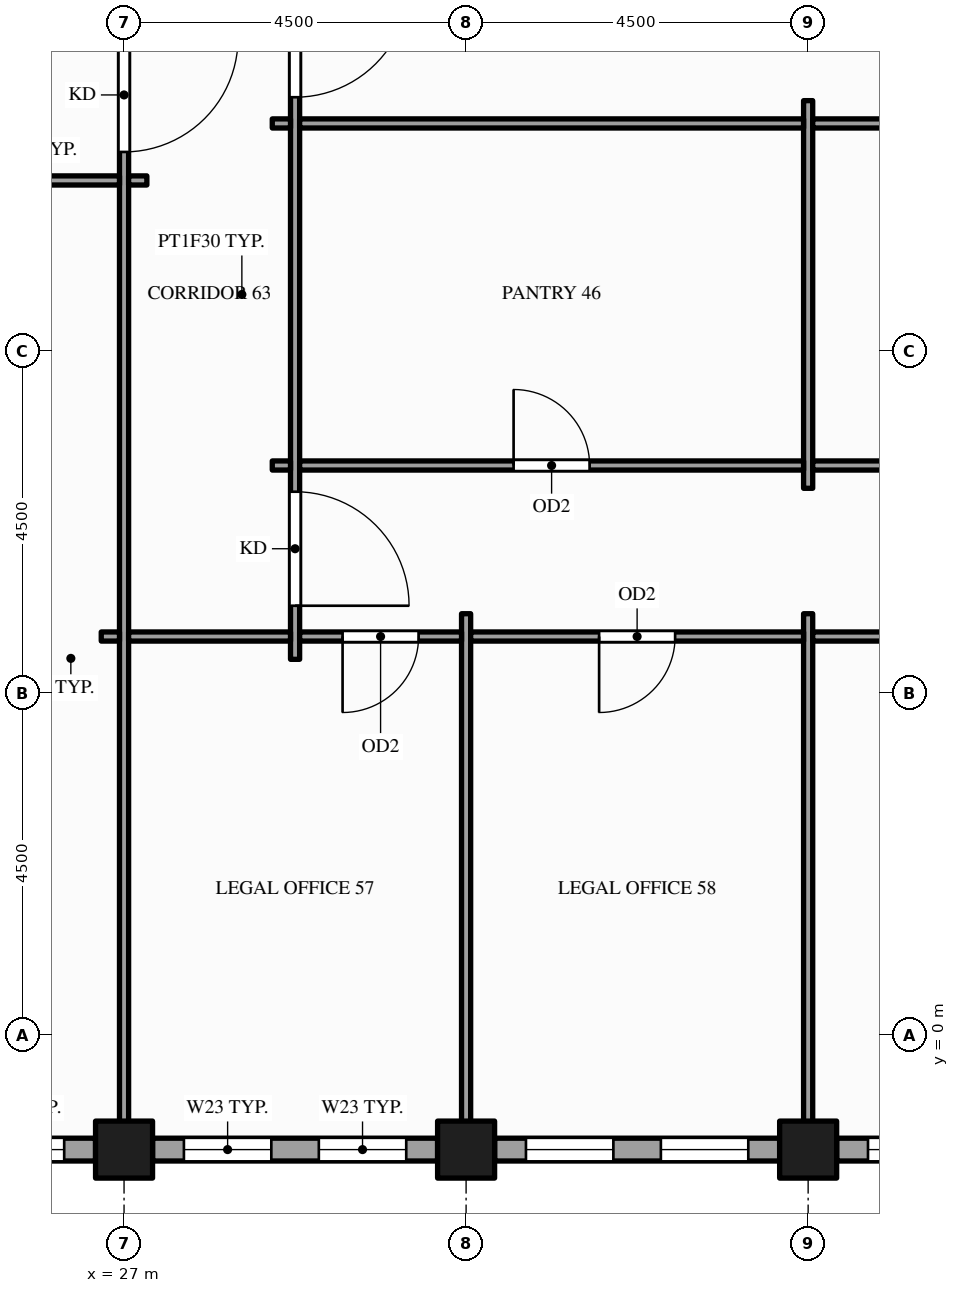
"""IFC4 building model, lengths in metres.
Left out: names, types, materials, properties, quantities, classifications, styles, units other than length and angle.
Written with IfcOpenShell. Run it as: python <this file> out.ifc"""

import sys

from ifc_helpers import new_model, si_unit, direction, frame, frame_2d, origin, origin_2d, place, context, subcontext, project, spatial, rectangle, hollow_rectangle, extrude, element, fill, save


model = new_model("IFC4")
c1 = context("Model", 3, precision=1e-05, world=origin(), true_north=direction((0.0, 1.0)))
c2 = subcontext(c1, "Body", "Model", "MODEL_VIEW")
j1 = project(units=[si_unit("LENGTHUNIT", "METRE"), si_unit("PLANEANGLEUNIT", "RADIAN")], contexts=[c1])
p1 = place(None, origin())
s1 = spatial("IfcSite", under=j1, at=p1, CompositionType="ELEMENT")
p2 = place(p1, origin())
s2 = spatial("IfcBuilding", under=s1, at=p2, CompositionType="ELEMENT")
p3 = place(p2, frame((0.0, 0.0, 207.0)))
s3 = spatial("IfcBuildingStorey", under=s2, at=p3, CompositionType="ELEMENT", Elevation=207.0)
for number, where, z_axis, x_axis in (
    (1, (27.0, -1.5, -0.15), (0.0, 0.0, 1.0), (1.0, 0.0, 0.0)),
    (2, (31.5, -1.5, -0.15), (0.0, 0.0, 1.0), (1.0, 0.0, 0.0)),
    (3, (36.0, -1.5, -0.15), (0.0, 0.0, 1.0), (1.0, 0.0, 0.0)),
):
    element("IfcColumn", number, at=place(p3, frame(where, z_axis=z_axis, x_axis=x_axis)), inside=s3, PredefinedType="COLUMN", context=c2, shape_type="SweptSolid", body=[
        extrude(hollow_rectangle(XDim=0.75, YDim=0.75, WallThickness=0.036, at=origin_2d()), origin(), (0.0, 0.0, 1.0), 4.0),
    ])
p4 = place(p3, frame((22.875, -1.5, 0.0), z_axis=(0.0, 0.0, 1.0), x_axis=(1.0, 0.0, 0.0)))
e4 = element("IfcWall", 4, at=p4, inside=s3, PredefinedType="STANDARD", context=c2, shape_type="SweptSolid", body=[
    extrude(rectangle(XDim=3.75, YDim=0.3, at=frame_2d((1.875, 0.0))), origin(), (0.0, 0.0, 1.0), 2.76),
])
p5 = place(p4, frame((0.413, 0.0, 0.9)))
e5 = element("IfcOpeningElement", 5, at=p5, cuts=e4, PredefinedType="OPENING", context=c2, shape_type="SweptSolid", body=[
    extrude(rectangle(XDim=1.15, YDim=1.5, at=frame_2d((0.575, 0.75))), frame((0.0, 0.16, 0.0), z_axis=(0.0, -1.0, 0.0), x_axis=(1.0, 0.0, 0.0)), (0.0, 0.0, 1.0), 0.32),
])
p6 = place(p4, frame((2.188, 0.0, 0.9)))
e6 = element("IfcOpeningElement", 6, at=p6, cuts=e4, PredefinedType="OPENING", context=c2, shape_type="SweptSolid", body=[
    extrude(rectangle(XDim=1.15, YDim=1.5, at=frame_2d((0.575, 0.75))), frame((0.0, 0.16, 0.0), z_axis=(0.0, -1.0, 0.0), x_axis=(1.0, 0.0, 0.0)), (0.0, 0.0, 1.0), 0.32),
])
p7 = place(p3, frame((27.375, -1.5, 0.0), z_axis=(0.0, 0.0, 1.0), x_axis=(1.0, 0.0, 0.0)))
e7 = element("IfcWall", 7, at=p7, inside=s3, PredefinedType="STANDARD", context=c2, shape_type="SweptSolid", body=[
    extrude(rectangle(XDim=3.75, YDim=0.3, at=frame_2d((1.875, 0.0))), origin(), (0.0, 0.0, 1.0), 2.87),
])
p8 = place(p7, frame((0.413, 0.0, 0.9)))
e8 = element("IfcOpeningElement", 8, at=p8, cuts=e7, PredefinedType="OPENING", context=c2, shape_type="SweptSolid", body=[
    extrude(rectangle(XDim=1.15, YDim=1.75, at=frame_2d((0.575, 0.875))), frame((0.0, 0.16, 0.0), z_axis=(0.0, -1.0, 0.0), x_axis=(1.0, 0.0, 0.0)), (0.0, 0.0, 1.0), 0.32),
])
p9 = place(p7, frame((2.188, 0.0, 0.9)))
e9 = element("IfcOpeningElement", 9, at=p9, cuts=e7, PredefinedType="OPENING", context=c2, shape_type="SweptSolid", body=[
    extrude(rectangle(XDim=1.15, YDim=1.75, at=frame_2d((0.575, 0.875))), frame((0.0, 0.16, 0.0), z_axis=(0.0, -1.0, 0.0), x_axis=(1.0, 0.0, 0.0)), (0.0, 0.0, 1.0), 0.32),
])
p10 = place(p3, frame((31.875, -1.5, 0.0), z_axis=(0.0, 0.0, 1.0), x_axis=(1.0, 0.0, 0.0)))
e10 = element("IfcWall", 10, at=p10, inside=s3, PredefinedType="STANDARD", context=c2, shape_type="SweptSolid", body=[
    extrude(rectangle(XDim=3.75, YDim=0.3, at=frame_2d((1.875, 0.0))), origin(), (0.0, 0.0, 1.0), 2.87),
])
p11 = place(p10, frame((0.413, 0.0, 0.9)))
e11 = element("IfcOpeningElement", 11, at=p11, cuts=e10, PredefinedType="OPENING", context=c2, shape_type="SweptSolid", body=[
    extrude(rectangle(XDim=1.15, YDim=1.75, at=frame_2d((0.575, 0.875))), frame((0.0, 0.16, 0.0), z_axis=(0.0, -1.0, 0.0), x_axis=(1.0, 0.0, 0.0)), (0.0, 0.0, 1.0), 0.32),
])
p12 = place(p10, frame((2.188, 0.0, 0.9)))
e12 = element("IfcOpeningElement", 12, at=p12, cuts=e10, PredefinedType="OPENING", context=c2, shape_type="SweptSolid", body=[
    extrude(rectangle(XDim=1.15, YDim=1.75, at=frame_2d((0.575, 0.875))), frame((0.0, 0.16, 0.0), z_axis=(0.0, -1.0, 0.0), x_axis=(1.0, 0.0, 0.0)), (0.0, 0.0, 1.0), 0.32),
])
p13 = place(p3, frame((36.375, -1.5, 0.0), z_axis=(0.0, 0.0, 1.0), x_axis=(1.0, 0.0, 0.0)))
e13 = element("IfcWall", 13, at=p13, inside=s3, PredefinedType="STANDARD", context=c2, shape_type="SweptSolid", body=[
    extrude(rectangle(XDim=3.75, YDim=0.3, at=frame_2d((1.875, 0.0))), origin(), (0.0, 0.0, 1.0), 2.87),
])
p14 = place(p13, frame((0.413, 0.0, 0.9)))
e14 = element("IfcOpeningElement", 14, at=p14, cuts=e13, PredefinedType="OPENING", context=c2, shape_type="SweptSolid", body=[
    extrude(rectangle(XDim=1.15, YDim=1.75, at=frame_2d((0.575, 0.875))), frame((0.0, 0.16, 0.0), z_axis=(0.0, -1.0, 0.0), x_axis=(1.0, 0.0, 0.0)), (0.0, 0.0, 1.0), 0.32),
])
p15 = place(p13, frame((2.188, 0.0, 0.9)))
e15 = element("IfcOpeningElement", 15, at=p15, cuts=e13, PredefinedType="OPENING", context=c2, shape_type="SweptSolid", body=[
    extrude(rectangle(XDim=1.15, YDim=1.75, at=frame_2d((0.575, 0.875))), frame((0.0, 0.16, 0.0), z_axis=(0.0, -1.0, 0.0), x_axis=(1.0, 0.0, 0.0)), (0.0, 0.0, 1.0), 0.32),
])
p16 = place(p3, frame((27.0, -1.35, 0.0), z_axis=(0.0, 0.0, 1.0), x_axis=(0.0, 1.0, 0.0)))
e16 = element("IfcWall", 16, at=p16, inside=s3, PredefinedType="PARTITIONING", context=c2, shape_type="SweptSolid", body=[
    extrude(rectangle(XDim=22.48, YDim=0.12, at=frame_2d((11.24, 0.0))), origin(), (0.0, 0.0, 1.0), 2.87),
])
p17 = place(p16, frame((12.975, 0.0, 0.0)))
e17 = element("IfcOpeningElement", 17, at=p17, cuts=e16, PredefinedType="OPENING", context=c2, shape_type="SweptSolid", body=[
    extrude(rectangle(XDim=1.5, YDim=2.1, at=frame_2d((0.75, 1.05))), frame((0.0, 0.07, 0.0), z_axis=(0.0, -1.0, 0.0), x_axis=(1.0, 0.0, 0.0)), (0.0, 0.0, 1.0), 0.14),
])
p18 = place(p3, frame((29.25, 4.95, 0.0), z_axis=(0.0, 0.0, 1.0), x_axis=(0.0, 1.0, 0.0)))
e18 = element("IfcWall", 18, at=p18, inside=s3, PredefinedType="PARTITIONING", context=c2, shape_type="SweptSolid", body=[
    extrude(rectangle(XDim=9.6, YDim=0.12, at=frame_2d((4.8, 0.0))), origin(), (0.0, 0.0, 1.0), 2.87),
])
p19 = place(p18, frame((0.705, 0.0, 0.0)))
e19 = element("IfcOpeningElement", 19, at=p19, cuts=e18, PredefinedType="OPENING", context=c2, shape_type="SweptSolid", body=[
    extrude(rectangle(XDim=1.5, YDim=2.1, at=frame_2d((0.75, 1.05))), frame((0.0, 0.07, 0.0), z_axis=(0.0, -1.0, 0.0), x_axis=(1.0, 0.0, 0.0)), (0.0, 0.0, 1.0), 0.14),
])
p20 = place(p18, frame((7.395, 0.0, 0.0)))
e20 = element("IfcOpeningElement", 20, at=p20, cuts=e18, PredefinedType="OPENING", context=c2, shape_type="SweptSolid", body=[
    extrude(rectangle(XDim=1.5, YDim=2.1, at=frame_2d((0.75, 1.05))), frame((0.0, 0.07, 0.0), z_axis=(0.0, -1.0, 0.0), x_axis=(1.0, 0.0, 0.0)), (0.0, 0.0, 1.0), 0.14),
])
for number, where, z_axis, x_axis in (
    (21, (31.5, -1.35, 0.0), (0.0, 0.0, 1.0), (0.0, 1.0, 0.0)),
    (22, (36.0, -1.35, 0.0), (0.0, 0.0, 1.0), (0.0, 1.0, 0.0)),
):
    element("IfcWall", number, at=place(p3, frame(where, z_axis=z_axis, x_axis=x_axis)), inside=s3, PredefinedType="PARTITIONING", context=c2, shape_type="SweptSolid", body=[
        extrude(rectangle(XDim=6.9, YDim=0.12, at=frame_2d((3.45, 0.0))), origin(), (0.0, 0.0, 1.0), 2.87),
    ])
p21 = place(p3, frame((36.0, 7.2, 0.0), z_axis=(0.0, 0.0, 1.0), x_axis=(0.0, 1.0, 0.0)))
e23 = element("IfcWall", 23, at=p21, inside=s3, PredefinedType="PARTITIONING", context=c2, shape_type="SweptSolid", body=[
    extrude(rectangle(XDim=5.1, YDim=0.12, at=frame_2d((2.55, 0.0))), origin(), (0.0, 0.0, 1.0), 2.87),
])
p22 = place(p3, frame((26.7, 5.25, 0.0), z_axis=(0.0, 0.0, 1.0), x_axis=(1.0, 0.0, 0.0)))
e24 = element("IfcWall", 24, at=p22, inside=s3, PredefinedType="PARTITIONING", context=c2, shape_type="SweptSolid", body=[
    extrude(rectangle(XDim=0.24, YDim=0.12, at=frame_2d((0.12, 0.0))), origin(), (0.0, 0.0, 1.0), 2.87),
])
p23 = place(p3, frame((27.06, 5.25, 0.0), z_axis=(0.0, 0.0, 1.0), x_axis=(1.0, 0.0, 0.0)))
e25 = element("IfcWall", 25, at=p23, inside=s3, PredefinedType="PARTITIONING", context=c2, shape_type="SweptSolid", body=[
    extrude(rectangle(XDim=2.13, YDim=0.12, at=frame_2d((1.065, 0.0))), origin(), (0.0, 0.0, 1.0), 2.87),
])
p24 = place(p3, frame((29.31, 5.25, 0.0), z_axis=(0.0, 0.0, 1.0), x_axis=(1.0, 0.0, 0.0)))
e26 = element("IfcWall", 26, at=p24, inside=s3, PredefinedType="PARTITIONING", context=c2, shape_type="SweptSolid", body=[
    extrude(rectangle(XDim=2.13, YDim=0.12, at=frame_2d((1.065, 0.0))), origin(), (0.0, 0.0, 1.0), 2.87),
])
p25 = place(p24, frame((0.565, 0.0, 0.0)))
e27 = element("IfcOpeningElement", 27, at=p25, cuts=e26, PredefinedType="OPENING", context=c2, shape_type="SweptSolid", body=[
    extrude(rectangle(XDim=1.0, YDim=2.1, at=frame_2d((0.5, 1.05))), frame((0.0, 0.07, 0.0), z_axis=(0.0, -1.0, 0.0), x_axis=(1.0, 0.0, 0.0)), (0.0, 0.0, 1.0), 0.14),
])
p26 = place(p3, frame((31.56, 5.25, 0.0), z_axis=(0.0, 0.0, 1.0), x_axis=(1.0, 0.0, 0.0)))
e28 = element("IfcWall", 28, at=p26, inside=s3, PredefinedType="PARTITIONING", context=c2, shape_type="SweptSolid", body=[
    extrude(rectangle(XDim=4.38, YDim=0.12, at=frame_2d((2.19, 0.0))), origin(), (0.0, 0.0, 1.0), 2.87),
])
p27 = place(p26, frame((1.69, 0.0, 0.0)))
e29 = element("IfcOpeningElement", 29, at=p27, cuts=e28, PredefinedType="OPENING", context=c2, shape_type="SweptSolid", body=[
    extrude(rectangle(XDim=1.0, YDim=2.1, at=frame_2d((0.5, 1.05))), frame((0.0, 0.07, 0.0), z_axis=(0.0, -1.0, 0.0), x_axis=(1.0, 0.0, 0.0)), (0.0, 0.0, 1.0), 0.14),
])
p28 = place(p3, frame((36.06, 5.25, 0.0), z_axis=(0.0, 0.0, 1.0), x_axis=(1.0, 0.0, 0.0)))
e30 = element("IfcWall", 30, at=p28, inside=s3, PredefinedType="PARTITIONING", context=c2, shape_type="SweptSolid", body=[
    extrude(rectangle(XDim=6.63, YDim=0.12, at=frame_2d((3.315, 0.0))), origin(), (0.0, 0.0, 1.0), 2.87),
])
p29 = place(p28, frame((2.415, 0.0, 0.0)))
e31 = element("IfcOpeningElement", 31, at=p29, cuts=e30, PredefinedType="OPENING", context=c2, shape_type="SweptSolid", body=[
    extrude(rectangle(XDim=1.8, YDim=2.1, at=frame_2d((0.9, 1.05))), frame((0.0, 0.07, 0.0), z_axis=(0.0, -1.0, 0.0), x_axis=(1.0, 0.0, 0.0)), (0.0, 0.0, 1.0), 0.14),
])
p30 = place(p3, frame((28.95, 7.5, 0.0), z_axis=(0.0, 0.0, 1.0), x_axis=(1.0, 0.0, 0.0)))
e32 = element("IfcWall", 32, at=p30, inside=s3, PredefinedType="PARTITIONING", context=c2, shape_type="SweptSolid", body=[
    extrude(rectangle(XDim=0.24, YDim=0.12, at=frame_2d((0.12, 0.0))), origin(), (0.0, 0.0, 1.0), 2.87),
])
p31 = place(p3, frame((29.31, 7.5, 0.0), z_axis=(0.0, 0.0, 1.0), x_axis=(1.0, 0.0, 0.0)))
e33 = element("IfcWall", 33, at=p31, inside=s3, PredefinedType="PARTITIONING", context=c2, shape_type="SweptSolid", body=[
    extrude(rectangle(XDim=6.63, YDim=0.12, at=frame_2d((3.315, 0.0))), origin(), (0.0, 0.0, 1.0), 2.87),
])
p32 = place(p31, frame((2.815, 0.0, 0.0)))
e34 = element("IfcOpeningElement", 34, at=p32, cuts=e33, PredefinedType="OPENING", context=c2, shape_type="SweptSolid", body=[
    extrude(rectangle(XDim=1.0, YDim=2.1, at=frame_2d((0.5, 1.05))), frame((0.0, 0.07, 0.0), z_axis=(0.0, -1.0, 0.0), x_axis=(1.0, 0.0, 0.0)), (0.0, 0.0, 1.0), 0.14),
])
p33 = place(p3, frame((36.06, 7.5, 0.0), z_axis=(0.0, 0.0, 1.0), x_axis=(1.0, 0.0, 0.0)))
e35 = element("IfcWall", 35, at=p33, inside=s3, PredefinedType="PARTITIONING", context=c2, shape_type="SweptSolid", body=[
    extrude(rectangle(XDim=6.63, YDim=0.12, at=frame_2d((3.315, 0.0))), origin(), (0.0, 0.0, 1.0), 2.87),
])
p34 = place(p3, frame((20.31, 11.25, 0.0), z_axis=(0.0, 0.0, 1.0), x_axis=(1.0, 0.0, 0.0)))
e36 = element("IfcWall", 36, at=p34, inside=s3, PredefinedType="PARTITIONING", context=c2, shape_type="SweptSolid", body=[
    extrude(rectangle(XDim=6.63, YDim=0.12, at=frame_2d((3.315, 0.0))), origin(), (0.0, 0.0, 1.0), 2.76),
])
p35 = place(p34, frame((2.865, 0.0, 0.0)))
e37 = element("IfcOpeningElement", 37, at=p35, cuts=e36, PredefinedType="OPENING", context=c2, shape_type="SweptSolid", body=[
    extrude(rectangle(XDim=0.9, YDim=2.1, at=frame_2d((0.45, 1.05))), frame((0.0, 0.07, 0.0), z_axis=(0.0, -1.0, 0.0), x_axis=(1.0, 0.0, 0.0)), (0.0, 0.0, 1.0), 0.14),
])
for number, where, z_axis, x_axis in (
    (38, (27.06, 11.25, 0.0), (0.0, 0.0, 1.0), (1.0, 0.0, 0.0)),
    (39, (28.95, 12.0, 0.0), (0.0, 0.0, 1.0), (1.0, 0.0, 0.0)),
):
    element("IfcWall", number, at=place(p3, frame(where, z_axis=z_axis, x_axis=x_axis)), inside=s3, PredefinedType="PARTITIONING", context=c2, shape_type="SweptSolid", body=[
        extrude(rectangle(XDim=0.24, YDim=0.12, at=frame_2d((0.12, 0.0))), origin(), (0.0, 0.0, 1.0), 2.87),
    ])
p36 = place(p3, frame((29.31, 12.0, 0.0), z_axis=(0.0, 0.0, 1.0), x_axis=(1.0, 0.0, 0.0)))
e40 = element("IfcWall", 40, at=p36, inside=s3, PredefinedType="PARTITIONING", context=c2, shape_type="SweptSolid", body=[
    extrude(rectangle(XDim=6.63, YDim=0.12, at=frame_2d((3.315, 0.0))), origin(), (0.0, 0.0, 1.0), 2.87),
])
p37 = place(p3, frame((36.06, 12.0, 0.0), z_axis=(0.0, 0.0, 1.0), x_axis=(1.0, 0.0, 0.0)))
e41 = element("IfcWall", 41, at=p37, inside=s3, PredefinedType="PARTITIONING", context=c2, shape_type="SweptSolid", body=[
    extrude(rectangle(XDim=6.63, YDim=0.12, at=frame_2d((3.315, 0.0))), origin(), (0.0, 0.0, 1.0), 2.87),
])
p38 = place(p37, frame((2.865, 0.0, 0.0)))
e42 = element("IfcOpeningElement", 42, at=p38, cuts=e41, PredefinedType="OPENING", context=c2, shape_type="SweptSolid", body=[
    extrude(rectangle(XDim=0.9, YDim=2.1, at=frame_2d((0.45, 1.05))), frame((0.0, 0.07, 0.0), z_axis=(0.0, -1.0, 0.0), x_axis=(1.0, 0.0, 0.0)), (0.0, 0.0, 1.0), 0.14),
])
p39 = place(p6, origin())
e43 = element("IfcWindow", 43, at=p39, inside=s3, PartitioningType="SINGLE_PANEL", PredefinedType="WINDOW", context=c2, shape_type="SweptSolid", body=[
    extrude(rectangle(XDim=1.15, YDim=1.5, at=frame_2d((0.575, 0.75))), frame((0.0, 0.03, 0.0), z_axis=(0.0, -1.0, 0.0), x_axis=(1.0, 0.0, 0.0)), (0.0, 0.0, 1.0), 0.06),
])
fill(e6, e43)
p40 = place(p8, origin())
e44 = element("IfcWindow", 44, at=p40, inside=s3, PartitioningType="SINGLE_PANEL", PredefinedType="WINDOW", context=c2, shape_type="SweptSolid", body=[
    extrude(rectangle(XDim=1.15, YDim=1.75, at=frame_2d((0.575, 0.875))), frame((0.0, 0.03, 0.0), z_axis=(0.0, -1.0, 0.0), x_axis=(1.0, 0.0, 0.0)), (0.0, 0.0, 1.0), 0.06),
])
fill(e8, e44)
p41 = place(p9, origin())
e45 = element("IfcWindow", 45, at=p41, inside=s3, PartitioningType="SINGLE_PANEL", PredefinedType="WINDOW", context=c2, shape_type="SweptSolid", body=[
    extrude(rectangle(XDim=1.15, YDim=1.75, at=frame_2d((0.575, 0.875))), frame((0.0, 0.03, 0.0), z_axis=(0.0, -1.0, 0.0), x_axis=(1.0, 0.0, 0.0)), (0.0, 0.0, 1.0), 0.06),
])
fill(e9, e45)
p42 = place(p11, origin())
e46 = element("IfcWindow", 46, at=p42, inside=s3, PartitioningType="SINGLE_PANEL", PredefinedType="WINDOW", context=c2, shape_type="SweptSolid", body=[
    extrude(rectangle(XDim=1.15, YDim=1.75, at=frame_2d((0.575, 0.875))), frame((0.0, 0.03, 0.0), z_axis=(0.0, -1.0, 0.0), x_axis=(1.0, 0.0, 0.0)), (0.0, 0.0, 1.0), 0.06),
])
fill(e11, e46)
p43 = place(p12, origin())
e47 = element("IfcWindow", 47, at=p43, inside=s3, PartitioningType="SINGLE_PANEL", PredefinedType="WINDOW", context=c2, shape_type="SweptSolid", body=[
    extrude(rectangle(XDim=1.15, YDim=1.75, at=frame_2d((0.575, 0.875))), frame((0.0, 0.03, 0.0), z_axis=(0.0, -1.0, 0.0), x_axis=(1.0, 0.0, 0.0)), (0.0, 0.0, 1.0), 0.06),
])
fill(e12, e47)
p44 = place(p14, origin())
e48 = element("IfcWindow", 48, at=p44, inside=s3, PartitioningType="SINGLE_PANEL", PredefinedType="WINDOW", context=c2, shape_type="SweptSolid", body=[
    extrude(rectangle(XDim=1.15, YDim=1.75, at=frame_2d((0.575, 0.875))), frame((0.0, 0.03, 0.0), z_axis=(0.0, -1.0, 0.0), x_axis=(1.0, 0.0, 0.0)), (0.0, 0.0, 1.0), 0.06),
])
fill(e14, e48)
p45 = place(p17, origin())
e49 = element("IfcDoor", 49, at=p45, inside=s3, OperationType="SINGLE_SWING_RIGHT", PredefinedType="DOOR", context=c2, shape_type="SweptSolid", body=[
    extrude(rectangle(XDim=1.5, YDim=2.1, at=frame_2d((0.75, 1.05))), frame((0.0, 0.025, 0.0), z_axis=(0.0, -1.0, 0.0), x_axis=(1.0, 0.0, 0.0)), (0.0, 0.0, 1.0), 0.05),
])
fill(e17, e49)
p46 = place(p19, origin())
e50 = element("IfcDoor", 50, at=p46, inside=s3, OperationType="SINGLE_SWING_LEFT", PredefinedType="DOOR", context=c2, shape_type="SweptSolid", body=[
    extrude(rectangle(XDim=1.5, YDim=2.1, at=frame_2d((0.75, 1.05))), frame((0.0, 0.025, 0.0), z_axis=(0.0, -1.0, 0.0), x_axis=(1.0, 0.0, 0.0)), (0.0, 0.0, 1.0), 0.05),
])
fill(e19, e50)
p47 = place(p20, origin())
e51 = element("IfcDoor", 51, at=p47, inside=s3, OperationType="SINGLE_SWING_RIGHT", PredefinedType="DOOR", context=c2, shape_type="SweptSolid", body=[
    extrude(rectangle(XDim=1.5, YDim=2.1, at=frame_2d((0.75, 1.05))), frame((0.0, 0.025, 0.0), z_axis=(0.0, -1.0, 0.0), x_axis=(1.0, 0.0, 0.0)), (0.0, 0.0, 1.0), 0.05),
])
fill(e20, e51)
p48 = place(p32, origin())
e52 = element("IfcDoor", 52, at=p48, inside=s3, OperationType="SINGLE_SWING_LEFT", PredefinedType="DOOR", context=c2, shape_type="SweptSolid", body=[
    extrude(rectangle(XDim=1.0, YDim=2.1, at=frame_2d((0.5, 1.05))), frame((0.0, 0.025, 0.0), z_axis=(0.0, -1.0, 0.0), x_axis=(1.0, 0.0, 0.0)), (0.0, 0.0, 1.0), 0.05),
])
fill(e34, e52)
p49 = place(p25, origin())
e53 = element("IfcDoor", 53, at=p49, inside=s3, OperationType="SINGLE_SWING_LEFT", PredefinedType="DOOR", context=c2, shape_type="SweptSolid", body=[
    extrude(rectangle(XDim=1.0, YDim=2.1, at=frame_2d((0.5, 1.05))), frame((0.0, 0.025, 0.0), z_axis=(0.0, -1.0, 0.0), x_axis=(1.0, 0.0, 0.0)), (0.0, 0.0, 1.0), 0.05),
])
fill(e27, e53)
p50 = place(p27, origin())
e54 = element("IfcDoor", 54, at=p50, inside=s3, OperationType="SINGLE_SWING_LEFT", PredefinedType="DOOR", context=c2, shape_type="SweptSolid", body=[
    extrude(rectangle(XDim=1.0, YDim=2.1, at=frame_2d((0.5, 1.05))), frame((0.0, 0.025, 0.0), z_axis=(0.0, -1.0, 0.0), x_axis=(1.0, 0.0, 0.0)), (0.0, 0.0, 1.0), 0.05),
])
fill(e29, e54)
save(model, sys.argv[1])
